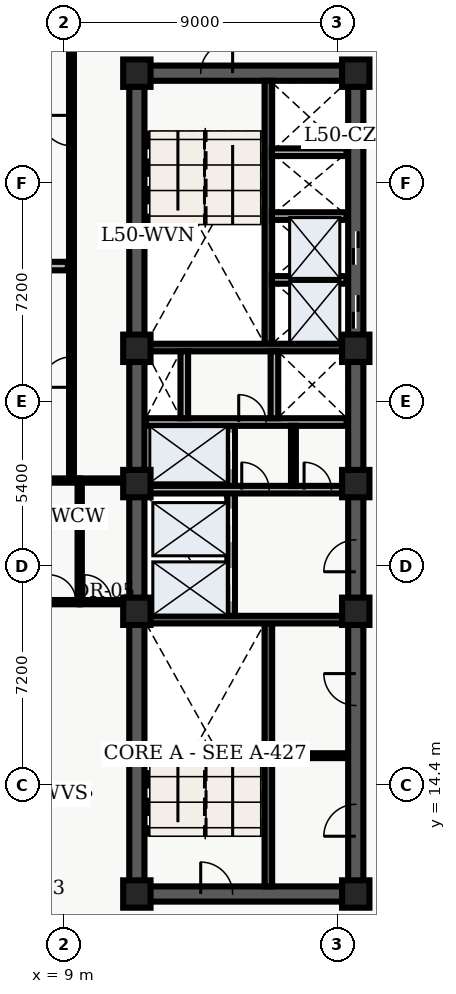
"""IFC4 building model, lengths in metres.
Left out: names, types, materials, properties, quantities, classifications, styles, units other than length and angle.
Written with IfcOpenShell. Run it as: python <this file> out.ifc"""

import sys

from ifc_helpers import new_model, entity, si_unit, converted_unit, direction, frame, origin_with_axes, origin_2d_with_axis, place, context, subcontext, project, spatial, polyline, rectangle, outline, extrude, element, fill, save


model = new_model("IFC4")
c1 = context("Model", 3, precision=1e-05, world=origin_with_axes(), true_north=direction((0.0, 1.0)))
c2 = subcontext(c1, "Body", "Model", "MODEL_VIEW")
j1 = project(units=[si_unit("LENGTHUNIT", "METRE"), converted_unit("PLANEANGLEUNIT", "DEGREE", entity("IfcPlaneAngleMeasure", 0.017), si_unit("PLANEANGLEUNIT", "RADIAN"), dimensions=[0, 0, 0, 0, 0, 0, 0])], contexts=[c1])
p1 = place(None, origin_with_axes())
s1 = spatial("IfcSite", under=j1, at=p1, CompositionType="ELEMENT")
p2 = place(p1, origin_with_axes())
s2 = spatial("IfcBuilding", under=s1, at=p2, CompositionType="ELEMENT")
p3 = place(p2, frame((0.0, 0.0, 204.3), z_axis=(0.0, 0.0, 1.0), x_axis=(1.0, 0.0, 0.0)))
s3 = spatial("IfcBuildingStorey", under=s2, at=p3, CompositionType="ELEMENT", Elevation=204.3)
p4 = place(p3, frame((11.4, 10.8, 0.0), z_axis=(0.0, 0.0, 1.0), x_axis=(0.0, 1.0, 0.0)))
e1 = element("IfcWall", 1, at=p4, inside=s3, PredefinedType="SHEAR", context=c2, shape_type="SweptSolid", body=[
    extrude(outline(polyline([(0.0, -0.25), (27.0, -0.25), (27.0, 0.25), (0.0, 0.25), (0.0, -0.25)])), origin_with_axes(), (0.0, 0.0, 1.0), 3.66),
])
p5 = place(p3, frame((11.4, 10.8, 0.0), z_axis=(0.0, 0.0, 1.0), x_axis=(1.0, 0.0, 0.0)))
e2 = element("IfcWall", 2, at=p5, inside=s3, PredefinedType="SHEAR", context=c2, shape_type="SweptSolid", body=[
    extrude(outline(polyline([(0.0, -0.25), (7.2, -0.25), (7.2, 0.25), (0.0, 0.25), (0.0, -0.25)])), origin_with_axes(), (0.0, 0.0, 1.0), 3.66),
])
p6 = place(p5, frame((2.625, 0.0, 0.0), z_axis=(0.0, 0.0, 1.0), x_axis=(1.0, 0.0, 0.0)))
e3 = element("IfcOpeningElement", 3, at=p6, cuts=e2, PredefinedType="OPENING", context=c2, shape_type="SweptSolid", body=[
    extrude(rectangle(XDim=1.05, YDim=0.52, at=origin_2d_with_axis()), origin_with_axes(), (0.0, 0.0, 1.0), 2.15),
])
p7 = place(p3, frame((11.4, 37.8, 0.0), z_axis=(0.0, 0.0, 1.0), x_axis=(1.0, 0.0, 0.0)))
e4 = element("IfcWall", 4, at=p7, inside=s3, PredefinedType="SHEAR", context=c2, shape_type="SweptSolid", body=[
    extrude(outline(polyline([(0.0, -0.25), (7.2, -0.25), (7.2, 0.25), (0.0, 0.25), (0.0, -0.25)])), origin_with_axes(), (0.0, 0.0, 1.0), 3.66),
])
p8 = place(p7, frame((2.625, 0.0, 0.0), z_axis=(0.0, 0.0, 1.0), x_axis=(1.0, 0.0, 0.0)))
e5 = element("IfcOpeningElement", 5, at=p8, cuts=e4, PredefinedType="OPENING", context=c2, shape_type="SweptSolid", body=[
    extrude(rectangle(XDim=1.05, YDim=0.52, at=origin_2d_with_axis()), origin_with_axes(), (0.0, 0.0, 1.0), 2.15),
])
p9 = place(p3, frame((18.6, 10.8, 0.0), z_axis=(0.0, 0.0, 1.0), x_axis=(0.0, 1.0, 0.0)))
e6 = element("IfcWall", 6, at=p9, inside=s3, PredefinedType="SHEAR", context=c2, shape_type="SweptSolid", body=[
    extrude(outline(polyline([(0.0, -0.25), (13.5, -0.25), (13.5, 0.25), (0.0, 0.25), (0.0, -0.25)])), origin_with_axes(), (0.0, 0.0, 1.0), 3.66),
])
p10 = place(p9, frame((11.125, 0.0, 0.0), z_axis=(0.0, 0.0, 1.0), x_axis=(1.0, 0.0, 0.0)))
e7 = element("IfcOpeningElement", 7, at=p10, cuts=e6, PredefinedType="OPENING", context=c2, shape_type="SweptSolid", body=[
    extrude(rectangle(XDim=1.05, YDim=0.52, at=origin_2d_with_axis()), origin_with_axes(), (0.0, 0.0, 1.0), 2.15),
])
p11 = place(p9, frame((2.425, 0.0, 0.0), z_axis=(0.0, 0.0, 1.0), x_axis=(1.0, 0.0, 0.0)))
e8 = element("IfcOpeningElement", 8, at=p11, cuts=e6, PredefinedType="OPENING", context=c2, shape_type="SweptSolid", body=[
    extrude(rectangle(XDim=1.05, YDim=0.52, at=origin_2d_with_axis()), origin_with_axes(), (0.0, 0.0, 1.0), 2.15),
])
p12 = place(p9, frame((6.725, 0.0, 0.0), z_axis=(0.0, 0.0, 1.0), x_axis=(1.0, 0.0, 0.0)))
e9 = element("IfcOpeningElement", 9, at=p12, cuts=e6, PredefinedType="OPENING", context=c2, shape_type="SweptSolid", body=[
    extrude(rectangle(XDim=1.05, YDim=0.52, at=origin_2d_with_axis()), origin_with_axes(), (0.0, 0.0, 1.0), 2.15),
])
p13 = place(p3, frame((18.6, 24.3, 0.0), z_axis=(0.0, 0.0, 1.0), x_axis=(0.0, 1.0, 0.0)))
e10 = element("IfcWall", 10, at=p13, inside=s3, PredefinedType="SHEAR", context=c2, shape_type="SweptSolid", body=[
    extrude(outline(polyline([(0.0, -0.25), (13.5, -0.25), (13.5, 0.25), (0.0, 0.25), (0.0, -0.25)])), origin_with_axes(), (0.0, 0.0, 1.0), 3.66),
])
p14 = place(p13, frame((5.65, 0.0, 0.0), z_axis=(0.0, 0.0, 1.0), x_axis=(1.0, 0.0, 0.0)))
e11 = element("IfcOpeningElement", 11, at=p14, cuts=e10, PredefinedType="OPENING", context=c2, shape_type="SweptSolid", body=[
    extrude(rectangle(XDim=1.1, YDim=0.52, at=origin_2d_with_axis()), origin_with_axes(), (0.0, 0.0, 1.0), 2.15),
])
p15 = place(p13, frame((7.75, 0.0, 0.0), z_axis=(0.0, 0.0, 1.0), x_axis=(1.0, 0.0, 0.0)))
e12 = element("IfcOpeningElement", 12, at=p15, cuts=e10, PredefinedType="OPENING", context=c2, shape_type="SweptSolid", body=[
    extrude(rectangle(XDim=1.1, YDim=0.52, at=origin_2d_with_axis()), origin_with_axes(), (0.0, 0.0, 1.0), 2.15),
])
p16 = place(p3, frame((15.725, 11.05, 0.0), z_axis=(0.0, 0.0, 1.0), x_axis=(0.0, 1.0, 0.0)))
e13 = element("IfcWall", 13, at=p16, inside=s3, PredefinedType="SHEAR", context=c2, shape_type="SweptSolid", body=[
    extrude(outline(polyline([(0.0, -0.125), (8.65, -0.125), (8.65, 0.125), (0.0, 0.125), (0.0, -0.125)])), origin_with_axes(), (0.0, 0.0, 1.0), 3.66),
])
p17 = place(p3, frame((11.65, 19.825, 0.0), z_axis=(0.0, 0.0, 1.0), x_axis=(1.0, 0.0, 0.0)))
e14 = element("IfcWall", 14, at=p17, inside=s3, PredefinedType="SHEAR", context=c2, shape_type="SweptSolid", body=[
    extrude(outline(polyline([(0.0, -0.125), (6.7, -0.125), (6.7, 0.125), (0.0, 0.125), (0.0, -0.125)])), origin_with_axes(), (0.0, 0.0, 1.0), 3.66),
])
p18 = place(p3, frame((15.725, 28.9, 0.0), z_axis=(0.0, 0.0, 1.0), x_axis=(0.0, 1.0, 0.0)))
e15 = element("IfcWall", 15, at=p18, inside=s3, PredefinedType="SHEAR", context=c2, shape_type="SweptSolid", body=[
    extrude(outline(polyline([(0.0, -0.125), (8.65, -0.125), (8.65, 0.125), (0.0, 0.125), (0.0, -0.125)])), origin_with_axes(), (0.0, 0.0, 1.0), 3.66),
])
p19 = place(p3, frame((11.65, 28.775, 0.0), z_axis=(0.0, 0.0, 1.0), x_axis=(1.0, 0.0, 0.0)))
e16 = element("IfcWall", 16, at=p19, inside=s3, PredefinedType="SHEAR", context=c2, shape_type="SweptSolid", body=[
    extrude(outline(polyline([(0.0, -0.125), (6.7, -0.125), (6.7, 0.125), (0.0, 0.125), (0.0, -0.125)])), origin_with_axes(), (0.0, 0.0, 1.0), 3.66),
])
p20 = place(p3, frame((14.5, 19.95, 0.0), z_axis=(0.0, 0.0, 1.0), x_axis=(0.0, 1.0, 0.0)))
e17 = element("IfcWall", 17, at=p20, inside=s3, PredefinedType="SOLIDWALL", context=c2, shape_type="SweptSolid", body=[
    extrude(outline(polyline([(0.0, -0.125), (6.25, -0.125), (6.25, 0.125), (0.0, 0.125), (0.0, -0.125)])), origin_with_axes(), (0.0, 0.0, 1.0), 2.7),
])
p21 = place(p20, frame((1.025, 0.0, 0.0), z_axis=(0.0, 0.0, 1.0), x_axis=(1.0, 0.0, 0.0)))
e18 = element("IfcOpeningElement", 18, at=p21, cuts=e17, PredefinedType="OPENING", context=c2, shape_type="SweptSolid", body=[
    extrude(rectangle(XDim=1.1, YDim=0.27, at=origin_2d_with_axis()), origin_with_axes(), (0.0, 0.0, 1.0), 2.15),
])
p22 = place(p20, frame((2.975, 0.0, 0.0), z_axis=(0.0, 0.0, 1.0), x_axis=(1.0, 0.0, 0.0)))
e19 = element("IfcOpeningElement", 19, at=p22, cuts=e17, PredefinedType="OPENING", context=c2, shape_type="SweptSolid", body=[
    extrude(rectangle(XDim=1.1, YDim=0.27, at=origin_2d_with_axis()), origin_with_axes(), (0.0, 0.0, 1.0), 2.15),
])
p23 = place(p20, frame((5.425, 0.0, 0.0), z_axis=(0.0, 0.0, 1.0), x_axis=(1.0, 0.0, 0.0)))
e20 = element("IfcOpeningElement", 20, at=p23, cuts=e17, PredefinedType="OPENING", context=c2, shape_type="SweptSolid", body=[
    extrude(rectangle(XDim=1.2, YDim=0.27, at=origin_2d_with_axis()), origin_with_axes(), (0.0, 0.0, 1.0), 2.15),
])
p24 = place(p3, frame((11.7, 24.1, 0.0), z_axis=(0.0, 0.0, 1.0), x_axis=(1.0, 0.0, 0.0)))
e21 = element("IfcWall", 21, at=p24, inside=s3, PredefinedType="SOLIDWALL", context=c2, shape_type="SweptSolid", body=[
    extrude(outline(polyline([(0.0, -0.125), (6.6, -0.125), (6.6, 0.125), (0.0, 0.125), (0.0, -0.125)])), origin_with_axes(), (0.0, 0.0, 1.0), 2.7),
])
p25 = place(p24, frame((3.6, 0.0, 0.0), z_axis=(0.0, 0.0, 1.0), x_axis=(1.0, 0.0, 0.0)))
e22 = element("IfcOpeningElement", 22, at=p25, cuts=e21, PredefinedType="OPENING", context=c2, shape_type="SweptSolid", body=[
    extrude(rectangle(XDim=0.9, YDim=0.27, at=origin_2d_with_axis()), origin_with_axes(), (0.0, 0.0, 1.0), 2.15),
])
p26 = place(p24, frame((5.65, 0.0, 0.0), z_axis=(0.0, 0.0, 1.0), x_axis=(1.0, 0.0, 0.0)))
e23 = element("IfcOpeningElement", 23, at=p26, cuts=e21, PredefinedType="OPENING", context=c2, shape_type="SweptSolid", body=[
    extrude(rectangle(XDim=0.9, YDim=0.27, at=origin_2d_with_axis()), origin_with_axes(), (0.0, 0.0, 1.0), 2.15),
])
p27 = place(p3, frame((11.7, 26.325, 0.0), z_axis=(0.0, 0.0, 1.0), x_axis=(1.0, 0.0, 0.0)))
e24 = element("IfcWall", 24, at=p27, inside=s3, PredefinedType="SOLIDWALL", context=c2, shape_type="SweptSolid", body=[
    extrude(outline(polyline([(0.0, -0.125), (6.6, -0.125), (6.6, 0.125), (0.0, 0.125), (0.0, -0.125)])), origin_with_axes(), (0.0, 0.0, 1.0), 2.7),
])
p28 = place(p27, frame((3.5, 0.0, 0.0), z_axis=(0.0, 0.0, 1.0), x_axis=(1.0, 0.0, 0.0)))
e25 = element("IfcOpeningElement", 25, at=p28, cuts=e24, PredefinedType="OPENING", context=c2, shape_type="SweptSolid", body=[
    extrude(rectangle(XDim=0.9, YDim=0.27, at=origin_2d_with_axis()), origin_with_axes(), (0.0, 0.0, 1.0), 2.15),
])
for number, where, z_axis, x_axis in (
    (26, (12.96, 26.45, 0.0), (0.0, 0.0, 1.0), (0.0, 1.0, 0.0)),
    (27, (15.925, 26.45, 0.0), (0.0, 0.0, 1.0), (0.0, 1.0, 0.0)),
):
    element("IfcWall", number, at=place(p3, frame(where, z_axis=z_axis, x_axis=x_axis)), inside=s3, PredefinedType="SOLIDWALL", context=c2, shape_type="SweptSolid", body=[
        extrude(outline(polyline([(0.0, -0.125), (2.2, -0.125), (2.2, 0.125), (0.0, 0.125), (0.0, -0.125)])), origin_with_axes(), (0.0, 0.0, 1.0), 2.7),
    ])
for number, where, z_axis, x_axis in (
    (28, (11.4, 10.8, 0.0), (0.0, 0.0, 1.0), (1.0, 0.0, 0.0)),
    (29, (11.4, 20.1, 0.0), (0.0, 0.0, 1.0), (1.0, 0.0, 0.0)),
    (30, (11.4, 24.3, 0.0), (0.0, 0.0, 1.0), (1.0, 0.0, 0.0)),
    (31, (11.4, 28.75, 0.0), (0.0, 0.0, 1.0), (1.0, 0.0, 0.0)),
    (32, (11.4, 37.8, 0.0), (0.0, 0.0, 1.0), (1.0, 0.0, 0.0)),
    (33, (18.6, 10.8, 0.0), (0.0, 0.0, 1.0), (1.0, 0.0, 0.0)),
    (34, (18.6, 20.1, 0.0), (0.0, 0.0, 1.0), (1.0, 0.0, 0.0)),
    (35, (18.6, 24.3, 0.0), (0.0, 0.0, 1.0), (1.0, 0.0, 0.0)),
    (36, (18.6, 28.75, 0.0), (0.0, 0.0, 1.0), (1.0, 0.0, 0.0)),
    (37, (18.6, 37.8, 0.0), (0.0, 0.0, 1.0), (1.0, 0.0, 0.0)),
):
    element("IfcColumn", number, at=place(p3, frame(where, z_axis=z_axis, x_axis=x_axis)), inside=s3, PredefinedType="COLUMN", context=c2, shape_type="SweptSolid", body=[
        extrude(rectangle(XDim=0.9, YDim=0.9, at=origin_2d_with_axis()), origin_with_axes(), (0.0, 0.0, 1.0), 3.9),
    ])
p29 = place(p3, frame((16.55, 24.22, 0.0), z_axis=(0.0, 0.0, 1.0), x_axis=(0.0, 1.0, 0.0)))
e38 = element("IfcWall", 38, at=p29, inside=s3, PredefinedType="PARTITIONING", context=c2, shape_type="SweptSolid", body=[
    extrude(outline(polyline([(0.0, -0.08), (1.98, -0.08), (1.98, 0.08), (0.0, 0.08), (0.0, -0.08)])), origin_with_axes(), (0.0, 0.0, 1.0), 2.7),
])
p30 = place(p3, frame((15.84, 15.35, 0.0), z_axis=(0.0, 0.0, 1.0), x_axis=(1.0, 0.0, 0.0)))
e39 = element("IfcWall", 39, at=p30, inside=s3, PredefinedType="PARTITIONING", context=c2, shape_type="SweptSolid", body=[
    extrude(outline(polyline([(0.0, -0.08), (2.46, -0.08), (2.46, 0.08), (0.0, 0.08), (0.0, -0.08)])), origin_with_axes(), (0.0, 0.0, 1.0), 2.7),
])
for number, where, z_axis, x_axis in (
    (40, (15.84, 31.0, 0.0), (0.0, 0.0, 1.0), (1.0, 0.0, 0.0)),
    (41, (15.84, 33.1, 0.0), (0.0, 0.0, 1.0), (1.0, 0.0, 0.0)),
    (42, (15.84, 35.2, 0.0), (0.0, 0.0, 1.0), (1.0, 0.0, 0.0)),
):
    element("IfcWall", number, at=place(p3, frame(where, z_axis=z_axis, x_axis=x_axis)), inside=s3, PredefinedType="SOLIDWALL", context=c2, shape_type="SweptSolid", body=[
        extrude(outline(polyline([(0.0, -0.125), (2.46, -0.125), (2.46, 0.125), (0.0, 0.125), (0.0, -0.125)])), origin_with_axes(), (0.0, 0.0, 1.0), 2.7),
    ])
p31 = place(p3, frame((9.52, 20.4, 0.0), z_axis=(0.0, 0.0, 1.0), x_axis=(0.0, 1.0, 0.0)))
e43 = element("IfcWall", 43, at=p31, inside=s3, PredefinedType="PARTITIONING", context=c2, shape_type="SweptSolid", body=[
    extrude(outline(polyline([(0.0, -0.07), (4.0, -0.07), (4.0, 0.07), (0.0, 0.07), (0.0, -0.07)])), origin_with_axes(), (0.0, 0.0, 1.0), 2.7),
])
p32 = place(p3, frame((9.52, 20.4, 0.0), z_axis=(0.0, 0.0, 1.0), x_axis=(1.0, 0.0, 0.0)))
e44 = element("IfcWall", 44, at=p32, inside=s3, PredefinedType="PARTITIONING", context=c2, shape_type="SweptSolid", body=[
    extrude(outline(polyline([(0.0, -0.07), (1.58, -0.07), (1.58, 0.07), (0.0, 0.07), (0.0, -0.07)])), origin_with_axes(), (0.0, 0.0, 1.0), 2.7),
])
p33 = place(p32, frame((0.59, 0.0, 0.0), z_axis=(0.0, 0.0, 1.0), x_axis=(1.0, 0.0, 0.0)))
e45 = element("IfcOpeningElement", 45, at=p33, cuts=e44, PredefinedType="OPENING", context=c2, shape_type="SweptSolid", body=[
    extrude(rectangle(XDim=0.9, YDim=0.16, at=origin_2d_with_axis()), origin_with_axes(), (0.0, 0.0, 1.0), 2.15),
])
p34 = place(p3, frame((9.52, 24.4, 0.0), z_axis=(0.0, 0.0, 1.0), x_axis=(1.0, 0.0, 0.0)))
e46 = element("IfcWall", 46, at=p34, inside=s3, PredefinedType="PARTITIONING", context=c2, shape_type="SweptSolid", body=[
    extrude(outline(polyline([(0.0, -0.07), (1.58, -0.07), (1.58, 0.07), (0.0, 0.07), (0.0, -0.07)])), origin_with_axes(), (0.0, 0.0, 1.0), 2.7),
])
p35 = place(p3, frame((9.25, 24.4, 0.0), z_axis=(0.0, 0.0, 1.0), x_axis=(0.0, 1.0, 0.0)))
e47 = element("IfcWall", 47, at=p35, inside=s3, PredefinedType="PARTITIONING", context=c2, shape_type="SweptSolid", body=[
    extrude(outline(polyline([(0.0, -0.08), (16.1, -0.08), (16.1, 0.08), (0.0, 0.08), (0.0, -0.08)])), origin_with_axes(), (0.0, 0.0, 1.0), 2.7),
])
p36 = place(p35, frame((3.567, 0.0, 0.0), z_axis=(0.0, 0.0, 1.0), x_axis=(1.0, 0.0, 0.0)))
e48 = element("IfcOpeningElement", 48, at=p36, cuts=e47, PredefinedType="OPENING", context=c2, shape_type="SweptSolid", body=[
    extrude(rectangle(XDim=1.0, YDim=0.18, at=origin_2d_with_axis()), origin_with_axes(), (0.0, 0.0, 1.0), 2.15),
])
p37 = place(p35, frame((11.512, 0.0, 0.0), z_axis=(0.0, 0.0, 1.0), x_axis=(1.0, 0.0, 0.0)))
e49 = element("IfcOpeningElement", 49, at=p37, cuts=e47, PredefinedType="OPENING", context=c2, shape_type="SweptSolid", body=[
    extrude(rectangle(XDim=1.0, YDim=0.18, at=origin_2d_with_axis()), origin_with_axes(), (0.0, 0.0, 1.0), 2.15),
])
p38 = place(p3, frame((0.335, 20.4, 0.0), z_axis=(0.0, 0.0, 1.0), x_axis=(1.0, 0.0, 0.0)))
e50 = element("IfcWall", 50, at=p38, inside=s3, PredefinedType="PARTITIONING", context=c2, shape_type="SweptSolid", body=[
    extrude(outline(polyline([(0.0, -0.07), (9.185, -0.07), (9.185, 0.07), (0.0, 0.07), (0.0, -0.07)])), origin_with_axes(), (0.0, 0.0, 1.0), 2.7),
])
p39 = place(p38, frame((8.615, 0.0, 0.0), z_axis=(0.0, 0.0, 1.0), x_axis=(1.0, 0.0, 0.0)))
e51 = element("IfcOpeningElement", 51, at=p39, cuts=e50, PredefinedType="OPENING", context=c2, shape_type="SweptSolid", body=[
    extrude(rectangle(XDim=0.9, YDim=0.16, at=origin_2d_with_axis()), origin_with_axes(), (0.0, 0.0, 1.0), 2.15),
])
p40 = place(p3, frame((0.335, 24.4, 0.0), z_axis=(0.0, 0.0, 1.0), x_axis=(1.0, 0.0, 0.0)))
e52 = element("IfcWall", 52, at=p40, inside=s3, PredefinedType="PARTITIONING", context=c2, shape_type="SweptSolid", body=[
    extrude(outline(polyline([(0.0, -0.07), (9.185, -0.07), (9.185, 0.07), (0.0, 0.07), (0.0, -0.07)])), origin_with_axes(), (0.0, 0.0, 1.0), 2.7),
])
p41 = place(p3, frame((0.335, 31.455, 0.0), z_axis=(0.0, 0.0, 1.0), x_axis=(1.0, 0.0, 0.0)))
e53 = element("IfcWall", 53, at=p41, inside=s3, PredefinedType="PARTITIONING", context=c2, shape_type="SweptSolid", body=[
    extrude(outline(polyline([(0.0, -0.14), (8.795, -0.14), (8.795, 0.14), (0.0, 0.14), (0.0, -0.14)])), origin_with_axes(), (0.0, 0.0, 1.0), 2.7),
])
p42 = place(p13, frame((5.65, 0.0, 0.0), z_axis=(0.0, 0.0, 1.0), x_axis=(1.0, 0.0, 0.0)))
e54 = element("IfcDoor", 54, at=p42, inside=s3, OperationType="SLIDING_TO_LEFT", PredefinedType="DOOR", context=c2, shape_type="SweptSolid", body=[
    extrude(rectangle(XDim=1.1, YDim=0.09, at=origin_2d_with_axis()), origin_with_axes(), (0.0, 0.0, 1.0), 2.15),
])
fill(e11, e54)
p43 = place(p13, frame((7.75, 0.0, 0.0), z_axis=(0.0, 0.0, 1.0), x_axis=(1.0, 0.0, 0.0)))
e55 = element("IfcDoor", 55, at=p43, inside=s3, OperationType="SLIDING_TO_RIGHT", PredefinedType="DOOR", context=c2, shape_type="SweptSolid", body=[
    extrude(rectangle(XDim=1.1, YDim=0.09, at=origin_2d_with_axis()), origin_with_axes(), (0.0, 0.0, 1.0), 2.15),
])
fill(e12, e55)
p44 = place(p20, frame((1.025, 0.0, 0.0), z_axis=(0.0, 0.0, 1.0), x_axis=(1.0, 0.0, 0.0)))
e56 = element("IfcDoor", 56, at=p44, inside=s3, OperationType="SLIDING_TO_LEFT", PredefinedType="DOOR", context=c2, shape_type="SweptSolid", body=[
    extrude(rectangle(XDim=1.1, YDim=0.09, at=origin_2d_with_axis()), origin_with_axes(), (0.0, 0.0, 1.0), 2.15),
])
fill(e18, e56)
p45 = place(p20, frame((2.975, 0.0, 0.0), z_axis=(0.0, 0.0, 1.0), x_axis=(1.0, 0.0, 0.0)))
e57 = element("IfcDoor", 57, at=p45, inside=s3, OperationType="SLIDING_TO_RIGHT", PredefinedType="DOOR", context=c2, shape_type="SweptSolid", body=[
    extrude(rectangle(XDim=1.1, YDim=0.09, at=origin_2d_with_axis()), origin_with_axes(), (0.0, 0.0, 1.0), 2.15),
])
fill(e19, e57)
p46 = place(p20, frame((5.425, 0.0, 0.0), z_axis=(0.0, 0.0, 1.0), x_axis=(1.0, 0.0, 0.0)))
e58 = element("IfcDoor", 58, at=p46, inside=s3, OperationType="DOUBLE_DOOR_SLIDING", PredefinedType="DOOR", context=c2, shape_type="SweptSolid", body=[
    extrude(rectangle(XDim=1.2, YDim=0.09, at=origin_2d_with_axis()), origin_with_axes(), (0.0, 0.0, 1.0), 2.15),
])
fill(e20, e58)
p47 = place(p5, frame((2.625, 0.0, 0.0), z_axis=(0.0, 0.0, 1.0), x_axis=(1.0, 0.0, 0.0)))
e59 = element("IfcDoor", 59, at=p47, inside=s3, OperationType="SINGLE_SWING_LEFT", PredefinedType="DOOR", context=c2, shape_type="SweptSolid", body=[
    extrude(rectangle(XDim=1.05, YDim=0.09, at=origin_2d_with_axis()), origin_with_axes(), (0.0, 0.0, 1.0), 2.15),
])
fill(e3, e59)
p48 = place(p7, frame((2.625, 0.0, 0.0), z_axis=(0.0, 0.0, 1.0), x_axis=(1.0, 0.0, 0.0)))
e60 = element("IfcDoor", 60, at=p48, inside=s3, OperationType="SINGLE_SWING_RIGHT", PredefinedType="DOOR", context=c2, shape_type="SweptSolid", body=[
    extrude(rectangle(XDim=1.05, YDim=0.09, at=origin_2d_with_axis()), origin_with_axes(), (0.0, 0.0, 1.0), 2.15),
])
fill(e5, e60)
p49 = place(p9, frame((11.125, 0.0, 0.0), z_axis=(0.0, 0.0, 1.0), x_axis=(1.0, 0.0, 0.0)))
e61 = element("IfcDoor", 61, at=p49, inside=s3, OperationType="SINGLE_SWING_LEFT", PredefinedType="DOOR", context=c2, shape_type="SweptSolid", body=[
    extrude(rectangle(XDim=1.05, YDim=0.09, at=origin_2d_with_axis()), origin_with_axes(), (0.0, 0.0, 1.0), 2.15),
])
fill(e7, e61)
p50 = place(p24, frame((3.6, 0.0, 0.0), z_axis=(0.0, 0.0, 1.0), x_axis=(1.0, 0.0, 0.0)))
e62 = element("IfcDoor", 62, at=p50, inside=s3, OperationType="SINGLE_SWING_LEFT", PredefinedType="DOOR", context=c2, shape_type="SweptSolid", body=[
    extrude(rectangle(XDim=0.9, YDim=0.09, at=origin_2d_with_axis()), origin_with_axes(), (0.0, 0.0, 1.0), 2.15),
])
fill(e22, e62)
p51 = place(p24, frame((5.65, 0.0, 0.0), z_axis=(0.0, 0.0, 1.0), x_axis=(1.0, 0.0, 0.0)))
e63 = element("IfcDoor", 63, at=p51, inside=s3, OperationType="SINGLE_SWING_LEFT", PredefinedType="DOOR", context=c2, shape_type="SweptSolid", body=[
    extrude(rectangle(XDim=0.9, YDim=0.09, at=origin_2d_with_axis()), origin_with_axes(), (0.0, 0.0, 1.0), 2.15),
])
fill(e23, e63)
p52 = place(p27, frame((3.5, 0.0, 0.0), z_axis=(0.0, 0.0, 1.0), x_axis=(1.0, 0.0, 0.0)))
e64 = element("IfcDoor", 64, at=p52, inside=s3, OperationType="SINGLE_SWING_LEFT", PredefinedType="DOOR", context=c2, shape_type="SweptSolid", body=[
    extrude(rectangle(XDim=0.9, YDim=0.09, at=origin_2d_with_axis()), origin_with_axes(), (0.0, 0.0, 1.0), 2.15),
])
fill(e25, e64)
p53 = place(p9, frame((2.425, 0.0, 0.0), z_axis=(0.0, 0.0, 1.0), x_axis=(1.0, 0.0, 0.0)))
e65 = element("IfcDoor", 65, at=p53, inside=s3, OperationType="SINGLE_SWING_LEFT", PredefinedType="DOOR", context=c2, shape_type="SweptSolid", body=[
    extrude(rectangle(XDim=1.05, YDim=0.09, at=origin_2d_with_axis()), origin_with_axes(), (0.0, 0.0, 1.0), 2.15),
])
fill(e8, e65)
p54 = place(p9, frame((6.725, 0.0, 0.0), z_axis=(0.0, 0.0, 1.0), x_axis=(1.0, 0.0, 0.0)))
e66 = element("IfcDoor", 66, at=p54, inside=s3, OperationType="SINGLE_SWING_RIGHT", PredefinedType="DOOR", context=c2, shape_type="SweptSolid", body=[
    extrude(rectangle(XDim=1.05, YDim=0.09, at=origin_2d_with_axis()), origin_with_axes(), (0.0, 0.0, 1.0), 2.15),
])
fill(e9, e66)
p55 = place(p32, frame((0.59, 0.0, 0.0), z_axis=(0.0, 0.0, 1.0), x_axis=(1.0, 0.0, 0.0)))
e67 = element("IfcDoor", 67, at=p55, inside=s3, OperationType="SINGLE_SWING_LEFT", PredefinedType="DOOR", context=c2, shape_type="SweptSolid", body=[
    extrude(rectangle(XDim=0.9, YDim=0.084, at=origin_2d_with_axis()), origin_with_axes(), (0.0, 0.0, 1.0), 2.15),
])
fill(e45, e67)
p56 = place(p38, frame((8.615, 0.0, 0.0), z_axis=(0.0, 0.0, 1.0), x_axis=(1.0, 0.0, 0.0)))
e68 = element("IfcDoor", 68, at=p56, inside=s3, OperationType="SINGLE_SWING_LEFT", PredefinedType="DOOR", context=c2, shape_type="SweptSolid", body=[
    extrude(rectangle(XDim=0.9, YDim=0.084, at=origin_2d_with_axis()), origin_with_axes(), (0.0, 0.0, 1.0), 2.15),
])
fill(e51, e68)
p57 = place(p35, frame((3.567, 0.0, 0.0), z_axis=(0.0, 0.0, 1.0), x_axis=(1.0, 0.0, 0.0)))
e69 = element("IfcDoor", 69, at=p57, inside=s3, OperationType="SINGLE_SWING_LEFT", PredefinedType="DOOR", context=c2, shape_type="SweptSolid", body=[
    extrude(rectangle(XDim=1.0, YDim=0.09, at=origin_2d_with_axis()), origin_with_axes(), (0.0, 0.0, 1.0), 2.15),
])
fill(e48, e69)
p58 = place(p35, frame((11.512, 0.0, 0.0), z_axis=(0.0, 0.0, 1.0), x_axis=(1.0, 0.0, 0.0)))
e70 = element("IfcDoor", 70, at=p58, inside=s3, OperationType="SINGLE_SWING_RIGHT", PredefinedType="DOOR", context=c2, shape_type="SweptSolid", body=[
    extrude(rectangle(XDim=1.0, YDim=0.09, at=origin_2d_with_axis()), origin_with_axes(), (0.0, 0.0, 1.0), 2.15),
])
fill(e49, e70)
save(model, sys.argv[1])
